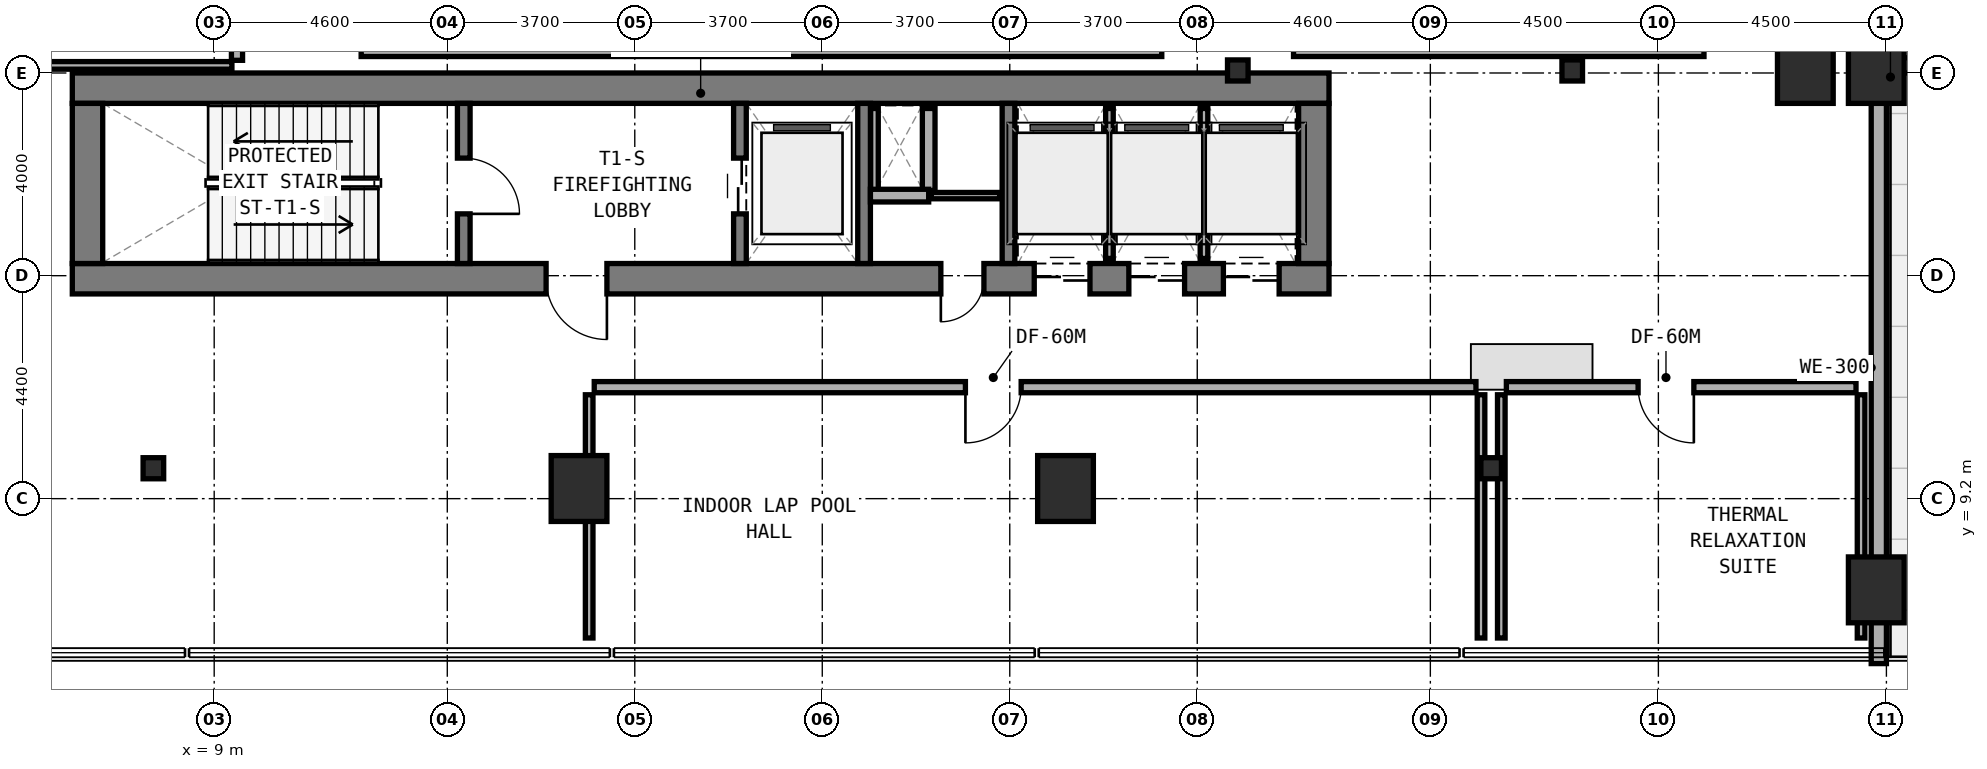
"""IFC4 building model, lengths in metres.
Left out: names, types, materials, properties, quantities, classifications, styles, units other than length and angle.
Written with IfcOpenShell. Run it as: python <this file> out.ifc"""

import sys

from ifc_helpers import new_model, si_unit, direction, frame, frame_2d, origin, origin_2d, place, context, subcontext, project, spatial, rectangle, i_section, extrude, element, fill, save


model = new_model("IFC4")
c1 = context("Model", 3, precision=1e-05, world=origin(), true_north=direction((0.0, 1.0)))
c2 = subcontext(c1, "Body", "Model", "MODEL_VIEW")
j1 = project(units=[si_unit("LENGTHUNIT", "METRE"), si_unit("PLANEANGLEUNIT", "RADIAN")], contexts=[c1])
p1 = place(None, origin())
s1 = spatial("IfcSite", under=j1, at=p1, CompositionType="ELEMENT")
p2 = place(p1, origin())
s2 = spatial("IfcBuilding", under=s1, at=p2, CompositionType="ELEMENT")
p3 = place(p2, frame((0.0, 0.0, 19.5)))
s3 = spatial("IfcBuildingStorey", under=s2, at=p3, CompositionType="ELEMENT", Elevation=19.5)
p4 = place(p3, frame((6.2, 13.54, 0.0), z_axis=(0.0, 0.0, 1.0), x_axis=(1.0, 0.0, 0.0)))
e1 = element("IfcWall", 1, at=p4, inside=s3, PredefinedType="SHEAR", context=c2, shape_type="SweptSolid", body=[
    extrude(rectangle(XDim=24.8, YDim=0.6, at=frame_2d((12.4, 0.0))), origin(), (0.0, 0.0, 1.0), 4.5),
])
p5 = place(p4, frame((9.35, 0.0, 0.0)))
e2 = element("IfcOpeningElement", 2, at=p5, cuts=e1, PredefinedType="OPENING", context=c2, shape_type="SweptSolid", body=[
    extrude(rectangle(XDim=1.2, YDim=2.15, at=frame_2d((0.6, 1.075))), frame((0.0, 0.31, 0.0), z_axis=(0.0, -1.0, 0.0), x_axis=(1.0, 0.0, 0.0)), (0.0, 0.0, 1.0), 0.62),
])
p6 = place(p4, frame((17.14, 0.0, 0.0)))
e3 = element("IfcOpeningElement", 3, at=p6, cuts=e1, PredefinedType="OPENING", context=c2, shape_type="SweptSolid", body=[
    extrude(rectangle(XDim=0.85, YDim=2.1, at=frame_2d((0.425, 1.05))), frame((0.0, 0.31, 0.0), z_axis=(0.0, -1.0, 0.0), x_axis=(1.0, 0.0, 0.0)), (0.0, 0.0, 1.0), 0.62),
])
p7 = place(p4, frame((18.983, 0.0, 0.0)))
e4 = element("IfcOpeningElement", 4, at=p7, cuts=e1, PredefinedType="OPENING", context=c2, shape_type="SweptSolid", body=[
    extrude(rectangle(XDim=1.1, YDim=2.15, at=frame_2d((0.55, 1.075))), frame((0.0, 0.31, 0.0), z_axis=(0.0, -1.0, 0.0), x_axis=(1.0, 0.0, 0.0)), (0.0, 0.0, 1.0), 0.62),
])
p8 = place(p4, frame((20.85, 0.0, 0.0)))
e5 = element("IfcOpeningElement", 5, at=p8, cuts=e1, PredefinedType="OPENING", context=c2, shape_type="SweptSolid", body=[
    extrude(rectangle(XDim=1.1, YDim=2.15, at=frame_2d((0.55, 1.075))), frame((0.0, 0.31, 0.0), z_axis=(0.0, -1.0, 0.0), x_axis=(1.0, 0.0, 0.0)), (0.0, 0.0, 1.0), 0.62),
])
p9 = place(p4, frame((22.716, 0.0, 0.0)))
e6 = element("IfcOpeningElement", 6, at=p9, cuts=e1, PredefinedType="OPENING", context=c2, shape_type="SweptSolid", body=[
    extrude(rectangle(XDim=1.1, YDim=2.15, at=frame_2d((0.55, 1.075))), frame((0.0, 0.31, 0.0), z_axis=(0.0, -1.0, 0.0), x_axis=(1.0, 0.0, 0.0)), (0.0, 0.0, 1.0), 0.62),
])
p10 = place(p3, frame((6.2, 17.3, 0.0), z_axis=(0.0, 0.0, 1.0), x_axis=(1.0, 0.0, 0.0)))
e7 = element("IfcWall", 7, at=p10, inside=s3, PredefinedType="SHEAR", context=c2, shape_type="SweptSolid", body=[
    extrude(rectangle(XDim=24.8, YDim=0.6, at=frame_2d((12.4, 0.0))), origin(), (0.0, 0.0, 1.0), 4.5),
])
for number, where, z_axis, x_axis in (
    (8, (6.5, 13.84, 0.0), (0.0, 0.0, 1.0), (0.0, 1.0, 0.0)),
    (9, (30.7, 13.84, 0.0), (0.0, 0.0, 1.0), (0.0, 1.0, 0.0)),
):
    element("IfcWall", number, at=place(p3, frame(where, z_axis=z_axis, x_axis=x_axis)), inside=s3, PredefinedType="SHEAR", context=c2, shape_type="SweptSolid", body=[
        extrude(rectangle(XDim=3.16, YDim=0.6, at=frame_2d((1.58, 0.0))), origin(), (0.0, 0.0, 1.0), 4.5),
    ])
p11 = place(p3, frame((13.925, 13.84, 0.0), z_axis=(0.0, 0.0, 1.0), x_axis=(0.0, 1.0, 0.0)))
e10 = element("IfcWall", 10, at=p11, inside=s3, PredefinedType="STANDARD", context=c2, shape_type="SweptSolid", body=[
    extrude(rectangle(XDim=3.16, YDim=0.25, at=frame_2d((1.58, 0.0))), origin(), (0.0, 0.0, 1.0), 4.22),
])
p12 = place(p11, frame((0.98, 0.0, 0.0)))
e11 = element("IfcOpeningElement", 11, at=p12, cuts=e10, PredefinedType="OPENING", context=c2, shape_type="SweptSolid", body=[
    extrude(rectangle(XDim=1.1, YDim=2.15, at=frame_2d((0.55, 1.075))), frame((0.0, 0.135, 0.0), z_axis=(0.0, -1.0, 0.0), x_axis=(1.0, 0.0, 0.0)), (0.0, 0.0, 1.0), 0.27),
])
p13 = place(p3, frame((19.375, 13.84, 0.0), z_axis=(0.0, 0.0, 1.0), x_axis=(0.0, 1.0, 0.0)))
e12 = element("IfcWall", 12, at=p13, inside=s3, PredefinedType="STANDARD", context=c2, shape_type="SweptSolid", body=[
    extrude(rectangle(XDim=3.16, YDim=0.25, at=frame_2d((1.58, 0.0))), origin(), (0.0, 0.0, 1.0), 4.22),
])
p14 = place(p13, frame((0.98, 0.0, 0.0)))
e13 = element("IfcOpeningElement", 13, at=p14, cuts=e12, PredefinedType="OPENING", context=c2, shape_type="SweptSolid", body=[
    extrude(rectangle(XDim=1.1, YDim=2.15, at=frame_2d((0.55, 1.075))), frame((0.0, 0.135, 0.0), z_axis=(0.0, -1.0, 0.0), x_axis=(1.0, 0.0, 0.0)), (0.0, 0.0, 1.0), 0.27),
])
for number, where, z_axis, x_axis in (
    (14, (21.825, 13.84, 0.0), (0.0, 0.0, 1.0), (0.0, 1.0, 0.0)),
    (15, (24.675, 13.84, 0.0), (0.0, 0.0, 1.0), (0.0, 1.0, 0.0)),
):
    element("IfcWall", number, at=place(p3, frame(where, z_axis=z_axis, x_axis=x_axis)), inside=s3, PredefinedType="STANDARD", context=c2, shape_type="SweptSolid", body=[
        extrude(rectangle(XDim=3.16, YDim=0.25, at=frame_2d((1.58, 0.0))), origin(), (0.0, 0.0, 1.0), 4.22),
    ])
for number, where, z_axis, x_axis in (
    (16, (16.2, 9.4, 0.0), (0.0, 0.0, 1.0), (1.0, 0.0, 0.0)),
    (17, (25.8, 9.4, 0.0), (0.0, 0.0, 1.0), (1.0, 0.0, 0.0)),
):
    element("IfcColumn", number, at=place(p3, frame(where, z_axis=z_axis, x_axis=x_axis)), inside=s3, PredefinedType="COLUMN", context=c2, shape_type="SweptSolid", body=[
        extrude(rectangle(XDim=1.1, YDim=1.3, at=origin_2d()), origin(), (0.0, 0.0, 1.0), 4.5),
    ])
for number, where, z_axis, x_axis in (
    (18, (7.8, 9.8, 0.0), (0.0, 0.0, 1.0), (1.0, 0.0, 0.0)),
    (19, (34.2, 9.8, 0.0), (0.0, 0.0, 1.0), (1.0, 0.0, 0.0)),
    (20, (35.8, 17.65, 0.0), (0.0, 0.0, 1.0), (1.0, 0.0, 0.0)),
    (21, (29.2, 17.65, 0.0), (0.0, 0.0, 1.0), (1.0, 0.0, 0.0)),
):
    element("IfcColumn", number, at=place(p3, frame(where, z_axis=z_axis, x_axis=x_axis)), inside=s3, PredefinedType="COLUMN", context=c2, shape_type="SweptSolid", body=[
        extrude(i_section(OverallWidth=0.406, OverallDepth=0.416, WebThickness=0.024, FlangeThickness=0.039, FilletRadius=0.015, at=origin_2d()), origin(), (0.0, 0.0, 1.0), 4.5),
    ])
for number, where, z_axis, x_axis in (
    (22, (40.4, 17.65, 0.0), (0.0, 0.0, 1.0), (1.0, 0.0, 0.0)),
    (23, (41.8, 17.65, 0.0), (0.0, 0.0, 1.0), (1.0, 0.0, 0.0)),
    (24, (41.8, 7.4, 0.0), (0.0, 0.0, 1.0), (1.0, 0.0, 0.0)),
):
    element("IfcColumn", number, at=place(p3, frame(where, z_axis=z_axis, x_axis=x_axis)), inside=s3, PredefinedType="COLUMN", context=c2, shape_type="SweptSolid", body=[
        extrude(rectangle(XDim=1.1, YDim=1.3, at=origin_2d()), origin(), (0.0, 0.0, 1.0), 4.5),
    ])
p15 = place(p3, frame((41.85, 5.945, 0.0), z_axis=(0.0, 0.0, 1.0), x_axis=(0.0, 1.0, 0.0)))
e25 = element("IfcWall", 25, at=p15, inside=s3, PredefinedType="STANDARD", context=c2, shape_type="SweptSolid", body=[
    extrude(rectangle(XDim=11.68, YDim=0.3, at=frame_2d((5.84, 0.0))), origin(), (0.0, 0.0, 1.0), 4.22),
])
p16 = place(p3, frame((42.01, 17.75, 0.0), z_axis=(0.0, 0.0, 1.0), x_axis=(1.0, 0.0, 0.0)))
e26 = element("IfcWall", 26, at=p16, inside=s3, PredefinedType="STANDARD", context=c2, shape_type="SweptSolid", body=[
    extrude(rectangle(XDim=5.331, YDim=0.3, at=frame_2d((2.666, 0.0))), origin(), (0.0, 0.0, 1.0), 4.22),
])
p17 = place(p16, frame((3.19, 0.0, 0.0)))
e27 = element("IfcOpeningElement", 27, at=p17, cuts=e26, PredefinedType="OPENING", context=c2, shape_type="SweptSolid", body=[
    extrude(rectangle(XDim=1.6, YDim=2.2, at=frame_2d((0.8, 1.1))), frame((0.0, 0.16, 0.0), z_axis=(0.0, -1.0, 0.0), x_axis=(1.0, 0.0, 0.0)), (0.0, 0.0, 1.0), 0.32),
])
p18 = place(p3, frame((22.03, 15.28, 0.0), z_axis=(0.0, 0.0, 1.0), x_axis=(0.0, 1.0, 0.0)))
e28 = element("IfcWall", 28, at=p18, inside=s3, PredefinedType="PARTITIONING", context=c2, shape_type="SweptSolid", body=[
    extrude(rectangle(XDim=1.62, YDim=0.15, at=frame_2d((0.81, 0.0))), origin(), (0.0, 0.0, 1.0), 4.22),
])
p19 = place(p3, frame((23.1, 15.28, 0.0), z_axis=(0.0, 0.0, 1.0), x_axis=(0.0, 1.0, 0.0)))
e29 = element("IfcWall", 29, at=p19, inside=s3, PredefinedType="SOLIDWALL", context=c2, shape_type="SweptSolid", body=[
    extrude(rectangle(XDim=1.62, YDim=0.25, at=frame_2d((0.81, 0.0))), origin(), (0.0, 0.0, 1.0), 4.22),
])
p20 = place(p3, frame((21.95, 15.18, 0.0), z_axis=(0.0, 0.0, 1.0), x_axis=(1.0, 0.0, 0.0)))
e30 = element("IfcWall", 30, at=p20, inside=s3, PredefinedType="SOLIDWALL", context=c2, shape_type="SweptSolid", body=[
    extrude(rectangle(XDim=1.15, YDim=0.25, at=frame_2d((0.575, 0.0))), origin(), (0.0, 0.0, 1.0), 4.22),
])
p21 = place(p3, frame((23.15, 15.18, 0.0), z_axis=(0.0, 0.0, 1.0), x_axis=(1.0, 0.0, 0.0)))
e31 = element("IfcWall", 31, at=p21, inside=s3, PredefinedType="PARTITIONING", context=c2, shape_type="SweptSolid", body=[
    extrude(rectangle(XDim=1.35, YDim=0.125, at=frame_2d((0.675, 0.0))), origin(), (0.0, 0.0, 1.0), 4.22),
])
p22 = place(p3, frame((26.667, 13.94, 0.0), z_axis=(0.0, 0.0, 1.0), x_axis=(0.0, 1.0, 0.0)))
e32 = element("IfcWall", 32, at=p22, inside=s3, PredefinedType="PARTITIONING", context=c2, shape_type="SweptSolid", body=[
    extrude(rectangle(XDim=2.96, YDim=0.15, at=frame_2d((1.48, 0.0))), origin(), (0.0, 0.0, 1.0), 4.22),
])
p23 = place(p3, frame((28.533, 13.94, 0.0), z_axis=(0.0, 0.0, 1.0), x_axis=(0.0, 1.0, 0.0)))
e33 = element("IfcWall", 33, at=p23, inside=s3, PredefinedType="PARTITIONING", context=c2, shape_type="SweptSolid", body=[
    extrude(rectangle(XDim=2.96, YDim=0.15, at=frame_2d((1.48, 0.0))), origin(), (0.0, 0.0, 1.0), 3.295),
])
p24 = place(p3, frame((11.9, 18.0, 0.0), z_axis=(0.0, 0.0, 1.0), x_axis=(1.0, 0.0, 0.0)))
e34 = element("IfcWall", 34, at=p24, inside=s3, PredefinedType="PARTITIONING", context=c2, shape_type="SweptSolid", body=[
    extrude(rectangle(XDim=15.8, YDim=0.15, at=frame_2d((7.9, 0.0))), origin(), (0.0, 0.0, 1.0), 4.22),
])
for number, where, z_axis, x_axis in (
    (35, (16.4, 6.45, 0.0), (0.0, 0.0, 1.0), (0.0, 1.0, 0.0)),
    (36, (34.0, 6.45, 0.0), (0.0, 0.0, 1.0), (0.0, 1.0, 0.0)),
):
    element("IfcWall", number, at=place(p3, frame(where, z_axis=z_axis, x_axis=x_axis)), inside=s3, PredefinedType="PARTITIONING", context=c2, shape_type="SweptSolid", body=[
        extrude(rectangle(XDim=4.8, YDim=0.15, at=frame_2d((2.4, 0.0))), origin(), (0.0, 0.0, 1.0), 3.295),
    ])
p25 = place(p3, frame((16.5, 11.4, 0.0), z_axis=(0.0, 0.0, 1.0), x_axis=(1.0, 0.0, 0.0)))
e37 = element("IfcWall", 37, at=p25, inside=s3, PredefinedType="SOLIDWALL", context=c2, shape_type="SweptSolid", body=[
    extrude(rectangle(XDim=17.4, YDim=0.22, at=frame_2d((8.7, 0.0))), origin(), (0.0, 0.0, 1.0), 3.295),
])
p26 = place(p25, frame((7.325, 0.0, 0.0)))
e38 = element("IfcOpeningElement", 38, at=p26, cuts=e37, PredefinedType="OPENING", context=c2, shape_type="SweptSolid", body=[
    extrude(rectangle(XDim=1.1, YDim=2.1, at=frame_2d((0.55, 1.05))), frame((0.0, 0.12, 0.0), z_axis=(0.0, -1.0, 0.0), x_axis=(1.0, 0.0, 0.0)), (0.0, 0.0, 1.0), 0.24),
])
p27 = place(p3, frame((34.4, 6.45, 0.0), z_axis=(0.0, 0.0, 1.0), x_axis=(0.0, 1.0, 0.0)))
e39 = element("IfcWall", 39, at=p27, inside=s3, PredefinedType="PARTITIONING", context=c2, shape_type="SweptSolid", body=[
    extrude(rectangle(XDim=4.8, YDim=0.15, at=frame_2d((2.4, 0.0))), origin(), (0.0, 0.0, 1.0), 3.295),
])
p28 = place(p3, frame((41.5, 6.45, 0.0), z_axis=(0.0, 0.0, 1.0), x_axis=(0.0, 1.0, 0.0)))
e40 = element("IfcWall", 40, at=p28, inside=s3, PredefinedType="PARTITIONING", context=c2, shape_type="SweptSolid", body=[
    extrude(rectangle(XDim=4.8, YDim=0.15, at=frame_2d((2.4, 0.0))), origin(), (0.0, 0.0, 1.0), 4.22),
])
p29 = place(p3, frame((34.5, 11.4, 0.0), z_axis=(0.0, 0.0, 1.0), x_axis=(1.0, 0.0, 0.0)))
e41 = element("IfcWall", 41, at=p29, inside=s3, PredefinedType="SOLIDWALL", context=c2, shape_type="SweptSolid", body=[
    extrude(rectangle(XDim=6.9, YDim=0.22, at=frame_2d((3.45, 0.0))), origin(), (0.0, 0.0, 1.0), 3.745),
])
p30 = place(p29, frame((2.6, 0.0, 0.0)))
e42 = element("IfcOpeningElement", 42, at=p30, cuts=e41, PredefinedType="OPENING", context=c2, shape_type="SweptSolid", body=[
    extrude(rectangle(XDim=1.1, YDim=2.1, at=frame_2d((0.55, 1.05))), frame((0.0, 0.12, 0.0), z_axis=(0.0, -1.0, 0.0), x_axis=(1.0, 0.0, 0.0)), (0.0, 0.0, 1.0), 0.24),
])
p31 = place(p3, frame((30.3, 18.0, 0.0), z_axis=(0.0, 0.0, 1.0), x_axis=(1.0, 0.0, 0.0)))
e43 = element("IfcWall", 43, at=p31, inside=s3, PredefinedType="PARTITIONING", context=c2, shape_type="SweptSolid", body=[
    extrude(rectangle(XDim=8.1, YDim=0.15, at=frame_2d((4.05, 0.0))), origin(), (0.0, 0.0, 1.0), 3.745),
])
p32 = place(p3, frame((0.45, 17.75, 0.0), z_axis=(0.0, 0.0, 1.0), x_axis=(1.0, 0.0, 0.0)))
e44 = element("IfcWall", 44, at=p32, inside=s3, PredefinedType="PARTITIONING", context=c2, shape_type="SweptSolid", body=[
    extrude(rectangle(XDim=8.9, YDim=0.15, at=frame_2d((4.45, 0.0))), origin(), (0.0, 0.0, 1.0), 4.22),
])
p33 = place(p3, frame((9.45, 17.85, 0.0), z_axis=(0.0, 0.0, 1.0), x_axis=(0.0, 1.0, 0.0)))
e45 = element("IfcWall", 45, at=p33, inside=s3, PredefinedType="SOLIDWALL", context=c2, shape_type="SweptSolid", body=[
    extrude(rectangle(XDim=4.85, YDim=0.22, at=frame_2d((2.425, 0.0))), origin(), (0.0, 0.0, 1.0), 3.295),
])
p34 = place(p33, frame((1.678, 0.0, 0.0)))
e46 = element("IfcOpeningElement", 46, at=p34, cuts=e45, PredefinedType="OPENING", context=c2, shape_type="SweptSolid", body=[
    extrude(rectangle(XDim=1.1, YDim=2.1, at=frame_2d((0.55, 1.05))), frame((0.0, 0.12, 0.0), z_axis=(0.0, -1.0, 0.0), x_axis=(1.0, 0.0, 0.0)), (0.0, 0.0, 1.0), 0.24),
])
p35 = place(p12, frame((1.1, 0.0, 0.0), z_axis=(0.0, 0.0, 1.0), x_axis=(-1.0, 0.0, 0.0)))
e47 = element("IfcDoor", 47, at=p35, inside=s3, OperationType="SINGLE_SWING_RIGHT", PredefinedType="DOOR", context=c2, shape_type="SweptSolid", body=[
    extrude(rectangle(XDim=1.1, YDim=2.15, at=frame_2d((0.55, 1.075))), frame((0.0, 0.025, 0.0), z_axis=(0.0, -1.0, 0.0), x_axis=(1.0, 0.0, 0.0)), (0.0, 0.0, 1.0), 0.05),
])
fill(e11, e47)
p36 = place(p5, frame((1.2, 0.0, 0.0), z_axis=(0.0, 0.0, 1.0), x_axis=(-1.0, 0.0, 0.0)))
e48 = element("IfcDoor", 48, at=p36, inside=s3, OperationType="SINGLE_SWING_LEFT", PredefinedType="DOOR", context=c2, shape_type="SweptSolid", body=[
    extrude(rectangle(XDim=1.2, YDim=2.15, at=frame_2d((0.6, 1.075))), frame((0.0, 0.025, 0.0), z_axis=(0.0, -1.0, 0.0), x_axis=(1.0, 0.0, 0.0)), (0.0, 0.0, 1.0), 0.05),
])
fill(e2, e48)
p37 = place(p14, origin())
e49 = element("IfcDoor", 49, at=p37, inside=s3, OperationType="DOUBLE_DOOR_SLIDING", PredefinedType="DOOR", context=c2, shape_type="SweptSolid", body=[
    extrude(rectangle(XDim=1.1, YDim=2.15, at=frame_2d((0.55, 1.075))), frame((0.0, 0.025, 0.0), z_axis=(0.0, -1.0, 0.0), x_axis=(1.0, 0.0, 0.0)), (0.0, 0.0, 1.0), 0.05),
])
fill(e13, e49)
p38 = place(p6, frame((0.85, 0.0, 0.0), z_axis=(0.0, 0.0, 1.0), x_axis=(-1.0, 0.0, 0.0)))
e50 = element("IfcDoor", 50, at=p38, inside=s3, OperationType="SINGLE_SWING_RIGHT", PredefinedType="DOOR", context=c2, shape_type="SweptSolid", body=[
    extrude(rectangle(XDim=0.85, YDim=2.1, at=frame_2d((0.425, 1.05))), frame((0.0, 0.025, 0.0), z_axis=(0.0, -1.0, 0.0), x_axis=(1.0, 0.0, 0.0)), (0.0, 0.0, 1.0), 0.05),
])
fill(e3, e50)
p39 = place(p7, frame((1.1, 0.0, 0.0), z_axis=(0.0, 0.0, 1.0), x_axis=(-1.0, 0.0, 0.0)))
e51 = element("IfcDoor", 51, at=p39, inside=s3, OperationType="DOUBLE_DOOR_SLIDING", PredefinedType="DOOR", context=c2, shape_type="SweptSolid", body=[
    extrude(rectangle(XDim=1.1, YDim=2.15, at=frame_2d((0.55, 1.075))), frame((0.0, 0.025, 0.0), z_axis=(0.0, -1.0, 0.0), x_axis=(1.0, 0.0, 0.0)), (0.0, 0.0, 1.0), 0.05),
])
fill(e4, e51)
p40 = place(p8, frame((1.1, 0.0, 0.0), z_axis=(0.0, 0.0, 1.0), x_axis=(-1.0, 0.0, 0.0)))
e52 = element("IfcDoor", 52, at=p40, inside=s3, OperationType="DOUBLE_DOOR_SLIDING", PredefinedType="DOOR", context=c2, shape_type="SweptSolid", body=[
    extrude(rectangle(XDim=1.1, YDim=2.15, at=frame_2d((0.55, 1.075))), frame((0.0, 0.025, 0.0), z_axis=(0.0, -1.0, 0.0), x_axis=(1.0, 0.0, 0.0)), (0.0, 0.0, 1.0), 0.05),
])
fill(e5, e52)
p41 = place(p9, frame((1.1, 0.0, 0.0), z_axis=(0.0, 0.0, 1.0), x_axis=(-1.0, 0.0, 0.0)))
e53 = element("IfcDoor", 53, at=p41, inside=s3, OperationType="DOUBLE_DOOR_SLIDING", PredefinedType="DOOR", context=c2, shape_type="SweptSolid", body=[
    extrude(rectangle(XDim=1.1, YDim=2.15, at=frame_2d((0.55, 1.075))), frame((0.0, 0.025, 0.0), z_axis=(0.0, -1.0, 0.0), x_axis=(1.0, 0.0, 0.0)), (0.0, 0.0, 1.0), 0.05),
])
fill(e6, e53)
p42 = place(p26, frame((1.1, 0.0, 0.0), z_axis=(0.0, 0.0, 1.0), x_axis=(-1.0, 0.0, 0.0)))
e54 = element("IfcDoor", 54, at=p42, inside=s3, OperationType="SINGLE_SWING_RIGHT", PredefinedType="DOOR", context=c2, shape_type="SweptSolid", body=[
    extrude(rectangle(XDim=1.1, YDim=2.1, at=frame_2d((0.55, 1.05))), frame((0.0, 0.025, 0.0), z_axis=(0.0, -1.0, 0.0), x_axis=(1.0, 0.0, 0.0)), (0.0, 0.0, 1.0), 0.05),
])
fill(e38, e54)
p43 = place(p30, frame((1.1, 0.0, 0.0), z_axis=(0.0, 0.0, 1.0), x_axis=(-1.0, 0.0, 0.0)))
e55 = element("IfcDoor", 55, at=p43, inside=s3, OperationType="SINGLE_SWING_LEFT", PredefinedType="DOOR", context=c2, shape_type="SweptSolid", body=[
    extrude(rectangle(XDim=1.1, YDim=2.1, at=frame_2d((0.55, 1.05))), frame((0.0, 0.025, 0.0), z_axis=(0.0, -1.0, 0.0), x_axis=(1.0, 0.0, 0.0)), (0.0, 0.0, 1.0), 0.05),
])
fill(e42, e55)
save(model, sys.argv[1])
